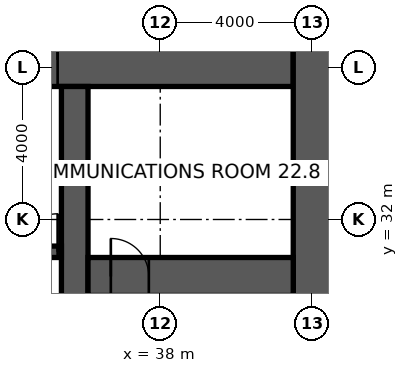
"""IFC4 building model, lengths in metres.
Left out: names, types, materials, properties, quantities, classifications, styles, units other than length and angle.
Written with IfcOpenShell. Run it as: python <this file> out.ifc"""

import sys

from ifc_helpers import new_model, si_unit, direction, frame, frame_2d, origin, place, context, subcontext, project, spatial, rectangle, extrude, element, fill, save


model = new_model("IFC4")
c1 = context("Model", 3, precision=1e-05, world=origin(), true_north=direction((0.0, 1.0)))
c2 = subcontext(c1, "Body", "Model", "MODEL_VIEW")
j1 = project(units=[si_unit("LENGTHUNIT", "METRE"), si_unit("PLANEANGLEUNIT", "RADIAN")], contexts=[c1])
p1 = place(None, origin())
s1 = spatial("IfcSite", under=j1, at=p1, CompositionType="ELEMENT")
p2 = place(p1, origin())
s2 = spatial("IfcBuilding", under=s1, at=p2, CompositionType="ELEMENT")
p3 = place(p2, origin())
s3 = spatial("IfcBuildingStorey", under=s2, at=p3, CompositionType="ELEMENT", Elevation=0.0)
p4 = place(p3, frame((18.5, 36.2, -0.3), z_axis=(0.0, 0.0, 1.0), x_axis=(1.0, 0.0, 0.0)))
e1 = element("IfcWall", 1, at=p4, inside=s3, PredefinedType="SHEAR", context=c2, shape_type="SweptSolid", body=[
    extrude(rectangle(XDim=23.0, YDim=1.4, at=frame_2d((11.5, 0.0))), origin(), (0.0, 0.0, 1.0), 6.15),
])
p5 = place(p4, frame((15.8, 0.0, 0.3)))
e2 = element("IfcOpeningElement", 2, at=p5, cuts=e1, PredefinedType="OPENING", context=c2, shape_type="SweptSolid", body=[
    extrude(rectangle(XDim=1.0, YDim=2.2, at=frame_2d((0.5, 1.1))), frame((0.0, 0.71, 0.0), z_axis=(0.0, -1.0, 0.0), x_axis=(1.0, 0.0, 0.0)), (0.0, 0.0, 1.0), 1.42),
])
p6 = place(p3, frame((42.0, 17.1, -0.3), z_axis=(0.0, 0.0, 1.0), x_axis=(0.0, 1.0, 0.0)))
e3 = element("IfcWall", 3, at=p6, inside=s3, PredefinedType="SHEAR", context=c2, shape_type="SweptSolid", body=[
    extrude(rectangle(XDim=19.8, YDim=1.0, at=frame_2d((9.9, 0.0))), origin(), (0.0, 0.0, 1.0), 6.15),
])
p7 = place(p3, frame((35.75, 18.5, -0.3), z_axis=(0.0, 0.0, 1.0), x_axis=(0.0, 1.0, 0.0)))
e4 = element("IfcWall", 4, at=p7, inside=s3, PredefinedType="SHEAR", context=c2, shape_type="SweptSolid", body=[
    extrude(rectangle(XDim=17.0, YDim=0.7, at=frame_2d((8.5, 0.0))), origin(), (0.0, 0.0, 1.0), 6.15),
])
p8 = place(p7, frame((9.85, 0.0, 0.3)))
e5 = element("IfcOpeningElement", 5, at=p8, cuts=e4, PredefinedType="OPENING", context=c2, shape_type="SweptSolid", body=[
    extrude(rectangle(XDim=1.0, YDim=2.2, at=frame_2d((0.5, 1.1))), frame((0.0, 0.36, 0.0), z_axis=(0.0, -1.0, 0.0), x_axis=(1.0, 0.0, 0.0)), (0.0, 0.0, 1.0), 0.72),
])
p9 = place(p3, frame((24.15, 31.15, -0.3), z_axis=(0.0, 0.0, 1.0), x_axis=(1.0, 0.0, 0.0)))
e6 = element("IfcWall", 6, at=p9, inside=s3, PredefinedType="SHEAR", context=c2, shape_type="SweptSolid", body=[
    extrude(rectangle(XDim=11.25, YDim=0.3, at=frame_2d((5.625, 0.0))), origin(), (0.0, 0.0, 1.0), 6.15),
])
p10 = place(p9, frame((10.15, 0.0, 0.3)))
e7 = element("IfcOpeningElement", 7, at=p10, cuts=e6, PredefinedType="OPENING", context=c2, shape_type="SweptSolid", body=[
    extrude(rectangle(XDim=1.0, YDim=2.2, at=frame_2d((0.5, 1.1))), frame((0.0, 0.16, 0.0), z_axis=(0.0, -1.0, 0.0), x_axis=(1.0, 0.0, 0.0)), (0.0, 0.0, 1.0), 0.32),
])
p11 = place(p9, frame((1.6, 0.0, 0.3)))
e8 = element("IfcOpeningElement", 8, at=p11, cuts=e6, PredefinedType="OPENING", context=c2, shape_type="SweptSolid", body=[
    extrude(rectangle(XDim=1.3, YDim=2.4, at=frame_2d((0.65, 1.2))), frame((0.0, 0.16, 0.0), z_axis=(0.0, -1.0, 0.0), x_axis=(1.0, 0.0, 0.0)), (0.0, 0.0, 1.0), 0.32),
])
p12 = place(p9, frame((4.4, 0.0, 0.3)))
e9 = element("IfcOpeningElement", 9, at=p12, cuts=e6, PredefinedType="OPENING", context=c2, shape_type="SweptSolid", body=[
    extrude(rectangle(XDim=1.3, YDim=2.4, at=frame_2d((0.65, 1.2))), frame((0.0, 0.16, 0.0), z_axis=(0.0, -1.0, 0.0), x_axis=(1.0, 0.0, 0.0)), (0.0, 0.0, 1.0), 0.32),
])
p13 = place(p9, frame((7.25, 0.0, 0.3)))
e10 = element("IfcOpeningElement", 10, at=p13, cuts=e6, PredefinedType="OPENING", context=c2, shape_type="SweptSolid", body=[
    extrude(rectangle(XDim=1.4, YDim=2.4, at=frame_2d((0.7, 1.2))), frame((0.0, 0.16, 0.0), z_axis=(0.0, -1.0, 0.0), x_axis=(1.0, 0.0, 0.0)), (0.0, 0.0, 1.0), 0.32),
])
p14 = place(p3, frame((36.1, 30.5, -0.3), z_axis=(0.0, 0.0, 1.0), x_axis=(1.0, 0.0, 0.0)))
e11 = element("IfcWall", 11, at=p14, inside=s3, PredefinedType="SHEAR", context=c2, shape_type="SweptSolid", body=[
    extrude(rectangle(XDim=5.4, YDim=1.0, at=frame_2d((2.7, 0.0))), origin(), (0.0, 0.0, 1.0), 6.15),
])
p15 = place(p14, frame((0.6, 0.0, 0.3)))
e12 = element("IfcOpeningElement", 12, at=p15, cuts=e11, PredefinedType="OPENING", context=c2, shape_type="SweptSolid", body=[
    extrude(rectangle(XDim=1.0, YDim=2.2, at=frame_2d((0.5, 1.1))), frame((0.0, 0.51, 0.0), z_axis=(0.0, -1.0, 0.0), x_axis=(1.0, 0.0, 0.0)), (0.0, 0.0, 1.0), 1.02),
])
p16 = place(p10, origin())
e13 = element("IfcDoor", 13, at=p16, inside=s3, OperationType="SINGLE_SWING_RIGHT", PredefinedType="DOOR", context=c2, shape_type="SweptSolid", body=[
    extrude(rectangle(XDim=1.0, YDim=2.2, at=frame_2d((0.5, 1.1))), frame((0.0, 0.025, 0.0), z_axis=(0.0, -1.0, 0.0), x_axis=(1.0, 0.0, 0.0)), (0.0, 0.0, 1.0), 0.05),
])
fill(e7, e13)
p17 = place(p5, origin())
e14 = element("IfcDoor", 14, at=p17, inside=s3, OperationType="SINGLE_SWING_RIGHT", PredefinedType="DOOR", context=c2, shape_type="SweptSolid", body=[
    extrude(rectangle(XDim=1.0, YDim=2.2, at=frame_2d((0.5, 1.1))), frame((0.0, 0.025, 0.0), z_axis=(0.0, -1.0, 0.0), x_axis=(1.0, 0.0, 0.0)), (0.0, 0.0, 1.0), 0.05),
])
fill(e2, e14)
p18 = place(p15, origin())
e15 = element("IfcDoor", 15, at=p18, inside=s3, OperationType="SINGLE_SWING_LEFT", PredefinedType="DOOR", context=c2, shape_type="SweptSolid", body=[
    extrude(rectangle(XDim=1.0, YDim=2.2, at=frame_2d((0.5, 1.1))), frame((0.0, 0.025, 0.0), z_axis=(0.0, -1.0, 0.0), x_axis=(1.0, 0.0, 0.0)), (0.0, 0.0, 1.0), 0.05),
])
fill(e12, e15)
save(model, sys.argv[1])
